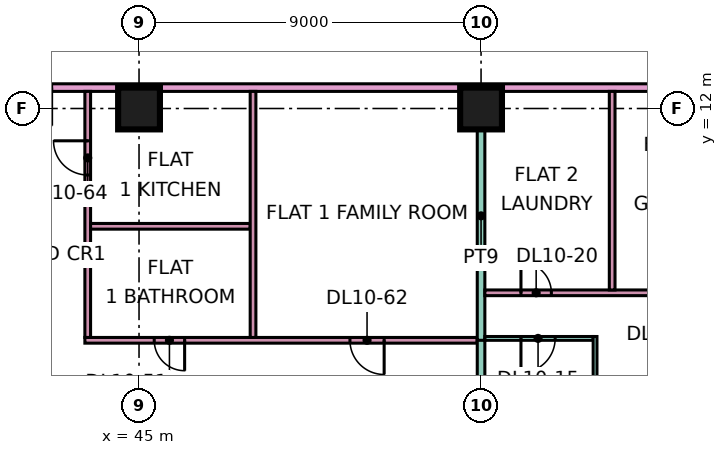
"""IFC4 building model, lengths in metres.
Left out: names, types, materials, properties, quantities, classifications, styles, units other than length and angle.
Written with IfcOpenShell. Run it as: python <this file> out.ifc"""

import sys

from ifc_helpers import new_model, si_unit, direction, frame, frame_2d, origin, origin_2d, place, context, subcontext, project, spatial, rectangle, extrude, element, fill, save


model = new_model("IFC4")
c1 = context("Model", 3, precision=1e-05, world=origin(), true_north=direction((0.0, 1.0)))
c2 = subcontext(c1, "Body", "Model", "MODEL_VIEW")
j1 = project(units=[si_unit("LENGTHUNIT", "METRE"), si_unit("PLANEANGLEUNIT", "RADIAN")], contexts=[c1])
p1 = place(None, origin())
s1 = spatial("IfcSite", under=j1, at=p1, CompositionType="ELEMENT")
p2 = place(p1, origin())
s2 = spatial("IfcBuilding", under=s1, at=p2, CompositionType="ELEMENT")
p3 = place(p2, frame((0.0, 0.0, 52.65)))
s3 = spatial("IfcBuildingStorey", under=s2, at=p3, CompositionType="ELEMENT", Elevation=52.65)
for number, where, z_axis, x_axis in (
    (1, (45.0, 12.0, 0.0), (0.0, 0.0, 1.0), (1.0, 0.0, 0.0)),
    (2, (54.0, 12.0, 0.0), (0.0, 0.0, 1.0), (1.0, 0.0, 0.0)),
):
    element("IfcColumn", number, at=place(p3, frame(where, z_axis=z_axis, x_axis=x_axis)), inside=s3, PredefinedType="COLUMN", context=c2, shape_type="SweptSolid", body=[
        extrude(rectangle(XDim=1.1, YDim=1.1, at=origin_2d()), origin(), (0.0, 0.0, 1.0), 3.75),
    ])
p4 = place(p3, frame((40.65, 12.55, 0.0), z_axis=(0.0, 0.0, 1.0), x_axis=(1.0, 0.0, 0.0)))
e3 = element("IfcWall", 3, at=p4, inside=s3, PredefinedType="PARTITIONING", context=c2, shape_type="SweptSolid", body=[
    extrude(rectangle(XDim=31.35, YDim=0.2, at=frame_2d((15.675, 0.0))), origin(), (0.0, 0.0, 1.0), 3.35),
])
p5 = place(p4, frame((24.0, 0.0, 0.0)))
e4 = element("IfcOpeningElement", 4, at=p5, cuts=e3, PredefinedType="OPENING", context=c2, shape_type="SweptSolid", body=[
    extrude(rectangle(XDim=1.0, YDim=2.1, at=frame_2d((0.5, 1.05))), frame((0.0, 0.11, 0.0), z_axis=(0.0, -1.0, 0.0), x_axis=(1.0, 0.0, 0.0)), (0.0, 0.0, 1.0), 0.22),
])
p6 = place(p4, frame((1.05, 0.0, 0.0)))
e5 = element("IfcOpeningElement", 5, at=p6, cuts=e3, PredefinedType="OPENING", context=c2, shape_type="SweptSolid", body=[
    extrude(rectangle(XDim=1.0, YDim=2.1, at=frame_2d((0.5, 1.05))), frame((0.0, 0.11, 0.0), z_axis=(0.0, -1.0, 0.0), x_axis=(1.0, 0.0, 0.0)), (0.0, 0.0, 1.0), 0.22),
])
p7 = place(p3, frame((43.575, 5.9, 0.0), z_axis=(0.0, 0.0, 1.0), x_axis=(1.0, 0.0, 0.0)))
e6 = element("IfcWall", 6, at=p7, inside=s3, PredefinedType="PARTITIONING", context=c2, shape_type="SweptSolid", body=[
    extrude(rectangle(XDim=10.325, YDim=0.15, at=frame_2d((5.163, 0.0))), origin(), (0.0, 0.0, 1.0), 3.35),
])
p8 = place(p7, frame((1.825, 0.0, 0.0)))
e7 = element("IfcOpeningElement", 7, at=p8, cuts=e6, PredefinedType="OPENING", context=c2, shape_type="SweptSolid", body=[
    extrude(rectangle(XDim=0.8, YDim=2.1, at=frame_2d((0.4, 1.05))), frame((0.0, 0.085, 0.0), z_axis=(0.0, -1.0, 0.0), x_axis=(1.0, 0.0, 0.0)), (0.0, 0.0, 1.0), 0.17),
])
p9 = place(p7, frame((6.975, 0.0, 0.0)))
e8 = element("IfcOpeningElement", 8, at=p9, cuts=e6, PredefinedType="OPENING", context=c2, shape_type="SweptSolid", body=[
    extrude(rectangle(XDim=0.9, YDim=2.1, at=frame_2d((0.45, 1.05))), frame((0.0, 0.085, 0.0), z_axis=(0.0, -1.0, 0.0), x_axis=(1.0, 0.0, 0.0)), (0.0, 0.0, 1.0), 0.17),
])
p10 = place(p3, frame((43.65, 5.975, 0.0), z_axis=(0.0, 0.0, 1.0), x_axis=(0.0, 1.0, 0.0)))
e9 = element("IfcWall", 9, at=p10, inside=s3, PredefinedType="PARTITIONING", context=c2, shape_type="SweptSolid", body=[
    extrude(rectangle(XDim=6.475, YDim=0.15, at=frame_2d((3.237, 0.0))), origin(), (0.0, 0.0, 1.0), 3.35),
])
p11 = place(p10, frame((4.275, 0.0, 0.0)))
e10 = element("IfcOpeningElement", 10, at=p11, cuts=e9, PredefinedType="OPENING", context=c2, shape_type="SweptSolid", body=[
    extrude(rectangle(XDim=0.9, YDim=2.1, at=frame_2d((0.45, 1.05))), frame((0.0, 0.085, 0.0), z_axis=(0.0, -1.0, 0.0), x_axis=(1.0, 0.0, 0.0)), (0.0, 0.0, 1.0), 0.17),
])
p12 = place(p3, frame((43.725, 8.9, 0.0), z_axis=(0.0, 0.0, 1.0), x_axis=(1.0, 0.0, 0.0)))
e11 = element("IfcWall", 11, at=p12, inside=s3, PredefinedType="PARTITIONING", context=c2, shape_type="SweptSolid", body=[
    extrude(rectangle(XDim=4.2, YDim=0.15, at=frame_2d((2.1, 0.0))), origin(), (0.0, 0.0, 1.0), 3.35),
])
p13 = place(p3, frame((48.0, 5.975, 0.0), z_axis=(0.0, 0.0, 1.0), x_axis=(0.0, 1.0, 0.0)))
e12 = element("IfcWall", 12, at=p13, inside=s3, PredefinedType="PARTITIONING", context=c2, shape_type="SweptSolid", body=[
    extrude(rectangle(XDim=6.475, YDim=0.15, at=frame_2d((3.237, 0.0))), origin(), (0.0, 0.0, 1.0), 3.35),
])
p14 = place(p3, frame((54.0, 0.074, 0.0), z_axis=(0.0, 0.0, 1.0), x_axis=(0.0, 1.0, 0.0)))
e13 = element("IfcWall", 13, at=p14, inside=s3, PredefinedType="PARTITIONING", context=c2, shape_type="SweptSolid", body=[
    extrude(rectangle(XDim=5.901, YDim=0.2, at=frame_2d((2.951, 0.0))), origin(), (0.0, 0.0, 1.0), 3.35),
])
p15 = place(p3, frame((54.0, 5.9, 0.0), z_axis=(0.0, 0.0, 1.0), x_axis=(0.0, 1.0, 0.0)))
e14 = element("IfcWall", 14, at=p15, inside=s3, PredefinedType="PARTITIONING", context=c2, shape_type="SweptSolid", body=[
    extrude(rectangle(XDim=6.55, YDim=0.2, at=frame_2d((3.275, 0.0))), origin(), (0.0, 0.0, 1.0), 3.35),
])
p16 = place(p3, frame((54.1, 5.95, 0.0), z_axis=(0.0, 0.0, 1.0), x_axis=(1.0, 0.0, 0.0)))
e15 = element("IfcWall", 15, at=p16, inside=s3, PredefinedType="PARTITIONING", context=c2, shape_type="SweptSolid", body=[
    extrude(rectangle(XDim=2.85, YDim=0.1, at=frame_2d((1.425, 0.0))), origin(), (0.0, 0.0, 1.0), 3.35),
])
p17 = place(p16, frame((0.95, 0.0, 0.0)))
e16 = element("IfcOpeningElement", 16, at=p17, cuts=e15, PredefinedType="OPENING", context=c2, shape_type="SweptSolid", body=[
    extrude(rectangle(XDim=0.9, YDim=2.1, at=frame_2d((0.45, 1.05))), frame((0.0, 0.06, 0.0), z_axis=(0.0, -1.0, 0.0), x_axis=(1.0, 0.0, 0.0)), (0.0, 0.0, 1.0), 0.12),
])
p18 = place(p3, frame((54.1, 7.15, 0.0), z_axis=(0.0, 0.0, 1.0), x_axis=(1.0, 0.0, 0.0)))
e17 = element("IfcWall", 17, at=p18, inside=s3, PredefinedType="PARTITIONING", context=c2, shape_type="SweptSolid", body=[
    extrude(rectangle(XDim=9.575, YDim=0.15, at=frame_2d((4.788, 0.0))), origin(), (0.0, 0.0, 1.0), 3.35),
])
p19 = place(p18, frame((7.55, 0.0, 0.0)))
e18 = element("IfcOpeningElement", 18, at=p19, cuts=e17, PredefinedType="OPENING", context=c2, shape_type="SweptSolid", body=[
    extrude(rectangle(XDim=0.8, YDim=2.1, at=frame_2d((0.4, 1.05))), frame((0.0, 0.085, 0.0), z_axis=(0.0, -1.0, 0.0), x_axis=(1.0, 0.0, 0.0)), (0.0, 0.0, 1.0), 0.17),
])
p20 = place(p18, frame((0.95, 0.0, 0.0)))
e19 = element("IfcOpeningElement", 19, at=p20, cuts=e17, PredefinedType="OPENING", context=c2, shape_type="SweptSolid", body=[
    extrude(rectangle(XDim=0.8, YDim=2.1, at=frame_2d((0.4, 1.05))), frame((0.0, 0.085, 0.0), z_axis=(0.0, -1.0, 0.0), x_axis=(1.0, 0.0, 0.0)), (0.0, 0.0, 1.0), 0.17),
])
p21 = place(p18, frame((4.4, 0.0, 0.0)))
e20 = element("IfcOpeningElement", 20, at=p21, cuts=e17, PredefinedType="OPENING", context=c2, shape_type="SweptSolid", body=[
    extrude(rectangle(XDim=0.8, YDim=2.1, at=frame_2d((0.4, 1.05))), frame((0.0, 0.085, 0.0), z_axis=(0.0, -1.0, 0.0), x_axis=(1.0, 0.0, 0.0)), (0.0, 0.0, 1.0), 0.17),
])
p22 = place(p3, frame((57.0, 0.074, 0.0), z_axis=(0.0, 0.0, 1.0), x_axis=(0.0, 1.0, 0.0)))
e21 = element("IfcWall", 21, at=p22, inside=s3, PredefinedType="PARTITIONING", context=c2, shape_type="SweptSolid", body=[
    extrude(rectangle(XDim=5.926, YDim=0.1, at=frame_2d((2.963, 0.0))), origin(), (0.0, 0.0, 1.0), 3.35),
])
p23 = place(p3, frame((57.45, 7.225, 0.0), z_axis=(0.0, 0.0, 1.0), x_axis=(0.0, 1.0, 0.0)))
e22 = element("IfcWall", 22, at=p23, inside=s3, PredefinedType="PARTITIONING", context=c2, shape_type="SweptSolid", body=[
    extrude(rectangle(XDim=5.225, YDim=0.15, at=frame_2d((2.612, 0.0))), origin(), (0.0, 0.0, 1.0), 3.35),
])
p24 = place(p17, frame((0.9, 0.0, 0.0), z_axis=(0.0, 0.0, 1.0), x_axis=(-1.0, 0.0, 0.0)))
e23 = element("IfcDoor", 23, at=p24, inside=s3, OperationType="SINGLE_SWING_LEFT", PredefinedType="DOOR", context=c2, shape_type="SweptSolid", body=[
    extrude(rectangle(XDim=0.9, YDim=2.1, at=frame_2d((0.45, 1.05))), frame((0.0, 0.025, 0.0), z_axis=(0.0, -1.0, 0.0), x_axis=(1.0, 0.0, 0.0)), (0.0, 0.0, 1.0), 0.05),
])
fill(e16, e23)
p25 = place(p20, origin())
e24 = element("IfcDoor", 24, at=p25, inside=s3, OperationType="SINGLE_SWING_LEFT", PredefinedType="DOOR", context=c2, shape_type="SweptSolid", body=[
    extrude(rectangle(XDim=0.8, YDim=2.1, at=frame_2d((0.4, 1.05))), frame((0.0, 0.025, 0.0), z_axis=(0.0, -1.0, 0.0), x_axis=(1.0, 0.0, 0.0)), (0.0, 0.0, 1.0), 0.05),
])
fill(e19, e24)
p26 = place(p8, origin())
e25 = element("IfcDoor", 25, at=p26, inside=s3, OperationType="SINGLE_SWING_RIGHT", PredefinedType="DOOR", context=c2, shape_type="SweptSolid", body=[
    extrude(rectangle(XDim=0.8, YDim=2.1, at=frame_2d((0.4, 1.05))), frame((0.0, 0.025, 0.0), z_axis=(0.0, -1.0, 0.0), x_axis=(1.0, 0.0, 0.0)), (0.0, 0.0, 1.0), 0.05),
])
fill(e7, e25)
p27 = place(p9, origin())
e26 = element("IfcDoor", 26, at=p27, inside=s3, OperationType="SINGLE_SWING_RIGHT", PredefinedType="DOOR", context=c2, shape_type="SweptSolid", body=[
    extrude(rectangle(XDim=0.9, YDim=2.1, at=frame_2d((0.45, 1.05))), frame((0.0, 0.025, 0.0), z_axis=(0.0, -1.0, 0.0), x_axis=(1.0, 0.0, 0.0)), (0.0, 0.0, 1.0), 0.05),
])
fill(e8, e26)
p28 = place(p11, frame((0.9, 0.0, 0.0), z_axis=(0.0, 0.0, 1.0), x_axis=(-1.0, 0.0, 0.0)))
e27 = element("IfcDoor", 27, at=p28, inside=s3, OperationType="SINGLE_SWING_RIGHT", PredefinedType="DOOR", context=c2, shape_type="SweptSolid", body=[
    extrude(rectangle(XDim=0.9, YDim=2.1, at=frame_2d((0.45, 1.05))), frame((0.0, 0.025, 0.0), z_axis=(0.0, -1.0, 0.0), x_axis=(1.0, 0.0, 0.0)), (0.0, 0.0, 1.0), 0.05),
])
fill(e10, e27)
save(model, sys.argv[1])
